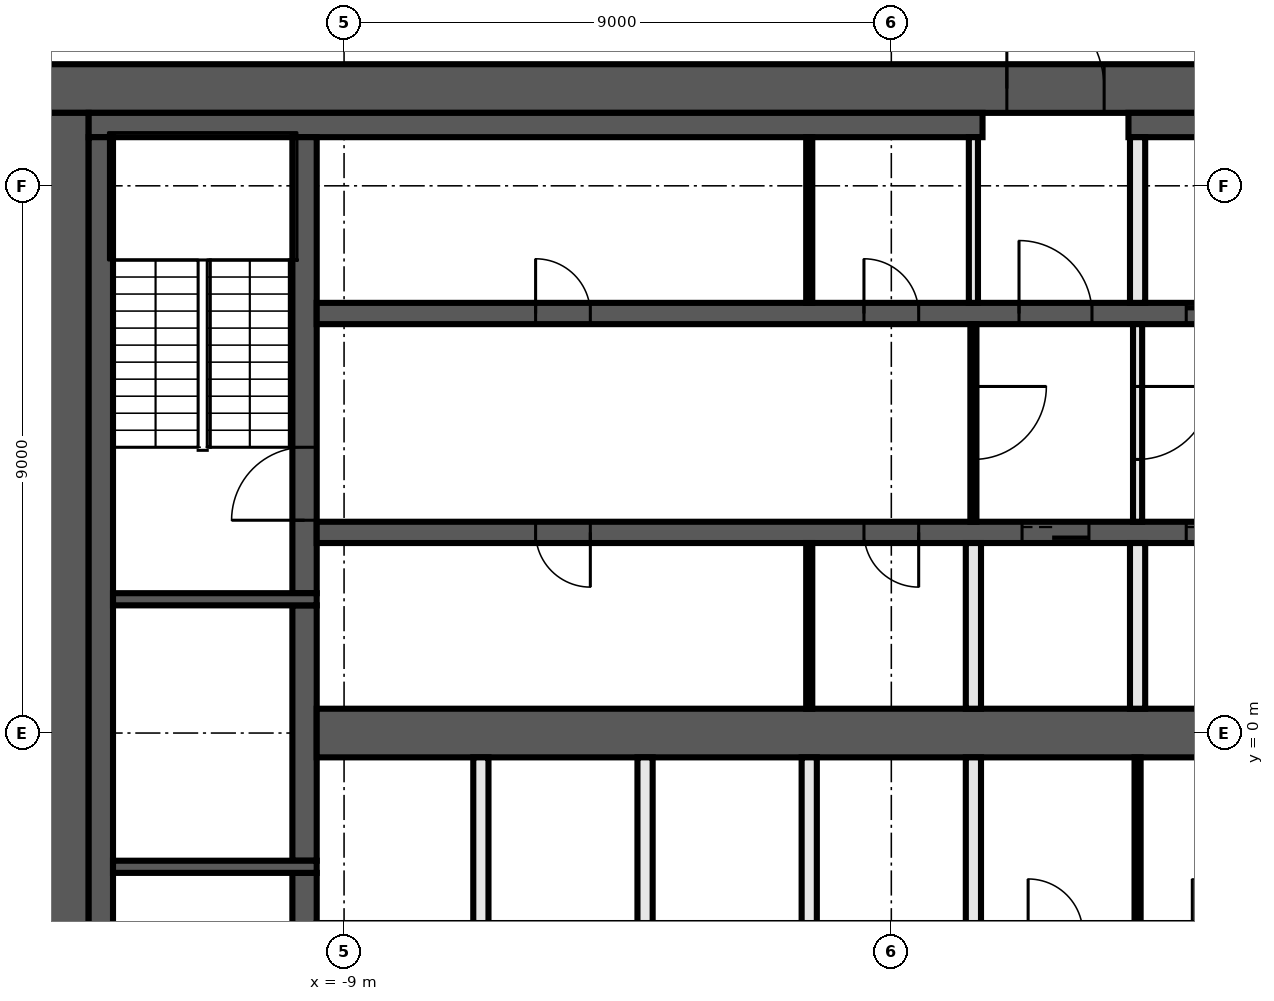
"""IFC4 building model, lengths in metres.
Left out: names, types, materials, properties, quantities, classifications, styles, units other than length and angle.
Written with IfcOpenShell. Run it as: python <this file> out.ifc"""

import sys

from ifc_helpers import new_model, si_unit, direction, frame, frame_2d, origin, place, context, subcontext, project, spatial, rectangle, extrude, element, fill, save


model = new_model("IFC4")
c1 = context("Model", 3, precision=1e-05, world=origin(), true_north=direction((0.0, 1.0)))
c2 = subcontext(c1, "Body", "Model", "MODEL_VIEW")
j1 = project(units=[si_unit("LENGTHUNIT", "METRE"), si_unit("PLANEANGLEUNIT", "RADIAN")], contexts=[c1])
p1 = place(None, origin())
s1 = spatial("IfcSite", under=j1, at=p1, CompositionType="ELEMENT")
p2 = place(p1, origin())
s2 = spatial("IfcBuilding", under=s1, at=p2, CompositionType="ELEMENT")
p3 = place(p2, frame((0.0, 0.0, 179.6)))
s3 = spatial("IfcBuildingStorey", under=s2, at=p3, CompositionType="ELEMENT", Elevation=179.6)
p4 = place(p3, frame((-14.0, 10.6, 0.0), z_axis=(0.0, 0.0, 1.0), x_axis=(1.0, 0.0, 0.0)))
e1 = element("IfcWall", 1, at=p4, inside=s3, PredefinedType="SHEAR", context=c2, shape_type="SweptSolid", body=[
    extrude(rectangle(XDim=28.0, YDim=0.8, at=frame_2d((14.0, 0.0))), origin(), (0.0, 0.0, 1.0), 3.7),
])
p5 = place(p4, frame((15.9, 0.0, 0.0)))
e2 = element("IfcOpeningElement", 2, at=p5, cuts=e1, PredefinedType="OPENING", context=c2, shape_type="SweptSolid", body=[
    extrude(rectangle(XDim=1.6, YDim=2.1, at=frame_2d((0.8, 1.05))), frame((0.0, 0.41, 0.0), z_axis=(0.0, -1.0, 0.0), x_axis=(1.0, 0.0, 0.0)), (0.0, 0.0, 1.0), 0.82),
])
p6 = place(p3, frame((-13.6, -10.2, 0.0), z_axis=(0.0, 0.0, 1.0), x_axis=(0.0, 1.0, 0.0)))
e3 = element("IfcWall", 3, at=p6, inside=s3, PredefinedType="SHEAR", context=c2, shape_type="SweptSolid", body=[
    extrude(rectangle(XDim=20.4, YDim=0.8, at=frame_2d((10.2, 0.0))), origin(), (0.0, 0.0, 1.0), 3.7),
])
p7 = place(p3, frame((-13.2, 10.0, 0.0), z_axis=(0.0, 0.0, 1.0), x_axis=(1.0, 0.0, 0.0)))
e4 = element("IfcWall", 4, at=p7, inside=s3, PredefinedType="SHEAR", context=c2, shape_type="SweptSolid", body=[
    extrude(rectangle(XDim=14.7, YDim=0.4, at=frame_2d((7.35, 0.0))), origin(), (0.0, 0.0, 1.0), 3.7),
])
p8 = place(p3, frame((3.9, 10.0, 0.0), z_axis=(0.0, 0.0, 1.0), x_axis=(1.0, 0.0, 0.0)))
e5 = element("IfcWall", 5, at=p8, inside=s3, PredefinedType="SHEAR", context=c2, shape_type="SweptSolid", body=[
    extrude(rectangle(XDim=9.3, YDim=0.4, at=frame_2d((4.65, 0.0))), origin(), (0.0, 0.0, 1.0), 3.7),
])
p9 = place(p3, frame((-13.0, -9.8, 0.0), z_axis=(0.0, 0.0, 1.0), x_axis=(0.0, 1.0, 0.0)))
e6 = element("IfcWall", 6, at=p9, inside=s3, PredefinedType="SHEAR", context=c2, shape_type="SweptSolid", body=[
    extrude(rectangle(XDim=19.6, YDim=0.4, at=frame_2d((9.8, 0.0))), origin(), (0.0, 0.0, 1.0), 3.7),
])
p10 = place(p3, frame((-9.65, -9.8, 0.0), z_axis=(0.0, 0.0, 1.0), x_axis=(0.0, 1.0, 0.0)))
e7 = element("IfcWall", 7, at=p10, inside=s3, PredefinedType="SHEAR", context=c2, shape_type="SweptSolid", body=[
    extrude(rectangle(XDim=7.5, YDim=0.4, at=frame_2d((3.75, 0.0))), origin(), (0.0, 0.0, 1.0), 3.7),
])
p11 = place(p10, frame((5.1, 0.0, 0.0)))
e8 = element("IfcOpeningElement", 8, at=p11, cuts=e7, PredefinedType="OPENING", context=c2, shape_type="SweptSolid", body=[
    extrude(rectangle(XDim=1.2, YDim=2.1, at=frame_2d((0.6, 1.05))), frame((0.0, 0.21, 0.0), z_axis=(0.0, -1.0, 0.0), x_axis=(1.0, 0.0, 0.0)), (0.0, 0.0, 1.0), 0.42),
])
p12 = place(p3, frame((-9.65, -2.1, 0.0), z_axis=(0.0, 0.0, 1.0), x_axis=(0.0, 1.0, 0.0)))
e9 = element("IfcWall", 9, at=p12, inside=s3, PredefinedType="SHEAR", context=c2, shape_type="SweptSolid", body=[
    extrude(rectangle(XDim=4.2, YDim=0.4, at=frame_2d((2.1, 0.0))), origin(), (0.0, 0.0, 1.0), 3.7),
])
p13 = place(p3, frame((-9.65, 2.3, 0.0), z_axis=(0.0, 0.0, 1.0), x_axis=(0.0, 1.0, 0.0)))
e10 = element("IfcWall", 10, at=p13, inside=s3, PredefinedType="SHEAR", context=c2, shape_type="SweptSolid", body=[
    extrude(rectangle(XDim=7.5, YDim=0.4, at=frame_2d((3.75, 0.0))), origin(), (0.0, 0.0, 1.0), 3.7),
])
p14 = place(p13, frame((1.2, 0.0, 0.0)))
e11 = element("IfcOpeningElement", 11, at=p14, cuts=e10, PredefinedType="OPENING", context=c2, shape_type="SweptSolid", body=[
    extrude(rectangle(XDim=1.2, YDim=2.1, at=frame_2d((0.6, 1.05))), frame((0.0, 0.21, 0.0), z_axis=(0.0, -1.0, 0.0), x_axis=(1.0, 0.0, 0.0)), (0.0, 0.0, 1.0), 0.42),
])
for number, where, z_axis, x_axis in (
    (12, (-9.45, 2.2, 0.0), (0.0, 0.0, 1.0), (-1.0, 0.0, 0.0)),
    (13, (-9.45, -2.2, 0.0), (0.0, 0.0, 1.0), (-1.0, 0.0, 0.0)),
):
    element("IfcWall", number, at=place(p3, frame(where, z_axis=z_axis, x_axis=x_axis)), inside=s3, PredefinedType="SHEAR", context=c2, shape_type="SweptSolid", body=[
        extrude(rectangle(XDim=3.35, YDim=0.2, at=frame_2d((1.675, 0.0))), origin(), (0.0, 0.0, 1.0), 3.7),
    ])
p15 = place(p3, frame((-9.45, 6.9, 0.0), z_axis=(0.0, 0.0, 1.0), x_axis=(1.0, 0.0, 0.0)))
e14 = element("IfcWall", 14, at=p15, inside=s3, PredefinedType="SHEAR", context=c2, shape_type="SweptSolid", body=[
    extrude(rectangle(XDim=18.9, YDim=0.35, at=frame_2d((9.45, 0.0))), origin(), (0.0, 0.0, 1.0), 3.7),
])
p16 = place(p15, frame((11.55, 0.0, 0.0)))
e15 = element("IfcOpeningElement", 15, at=p16, cuts=e14, PredefinedType="OPENING", context=c2, shape_type="SweptSolid", body=[
    extrude(rectangle(XDim=1.2, YDim=2.1, at=frame_2d((0.6, 1.05))), frame((0.0, 0.185, 0.0), z_axis=(0.0, -1.0, 0.0), x_axis=(1.0, 0.0, 0.0)), (0.0, 0.0, 1.0), 0.37),
])
p17 = place(p15, frame((14.3, 0.0, 0.0)))
e16 = element("IfcOpeningElement", 16, at=p17, cuts=e14, PredefinedType="OPENING", context=c2, shape_type="SweptSolid", body=[
    extrude(rectangle(XDim=1.1, YDim=2.1, at=frame_2d((0.55, 1.05))), frame((0.0, 0.185, 0.0), z_axis=(0.0, -1.0, 0.0), x_axis=(1.0, 0.0, 0.0)), (0.0, 0.0, 1.0), 0.37),
])
p18 = place(p15, frame((17.0, 0.0, 0.0)))
e17 = element("IfcOpeningElement", 17, at=p18, cuts=e14, PredefinedType="OPENING", context=c2, shape_type="SweptSolid", body=[
    extrude(rectangle(XDim=1.1, YDim=2.1, at=frame_2d((0.55, 1.05))), frame((0.0, 0.185, 0.0), z_axis=(0.0, -1.0, 0.0), x_axis=(1.0, 0.0, 0.0)), (0.0, 0.0, 1.0), 0.37),
])
p19 = place(p15, frame((3.6, 0.0, 0.0)))
e18 = element("IfcOpeningElement", 18, at=p19, cuts=e14, PredefinedType="OPENING", context=c2, shape_type="SweptSolid", body=[
    extrude(rectangle(XDim=0.9, YDim=2.1, at=frame_2d((0.45, 1.05))), frame((0.0, 0.185, 0.0), z_axis=(0.0, -1.0, 0.0), x_axis=(1.0, 0.0, 0.0)), (0.0, 0.0, 1.0), 0.37),
])
p20 = place(p15, frame((9.0, 0.0, 0.0)))
e19 = element("IfcOpeningElement", 19, at=p20, cuts=e14, PredefinedType="OPENING", context=c2, shape_type="SweptSolid", body=[
    extrude(rectangle(XDim=0.9, YDim=2.1, at=frame_2d((0.45, 1.05))), frame((0.0, 0.185, 0.0), z_axis=(0.0, -1.0, 0.0), x_axis=(1.0, 0.0, 0.0)), (0.0, 0.0, 1.0), 0.37),
])
p21 = place(p3, frame((9.45, 3.3, 0.0), z_axis=(0.0, 0.0, 1.0), x_axis=(-1.0, 0.0, 0.0)))
e20 = element("IfcWall", 20, at=p21, inside=s3, PredefinedType="SHEAR", context=c2, shape_type="SweptSolid", body=[
    extrude(rectangle(XDim=18.9, YDim=0.35, at=frame_2d((9.45, 0.0))), origin(), (0.0, 0.0, 1.0), 3.7),
])
p22 = place(p21, frame((6.2, 0.0, 0.0)))
e21 = element("IfcOpeningElement", 21, at=p22, cuts=e20, PredefinedType="OPENING", context=c2, shape_type="SweptSolid", body=[
    extrude(rectangle(XDim=1.1, YDim=2.1, at=frame_2d((0.55, 1.05))), frame((0.0, 0.185, 0.0), z_axis=(0.0, -1.0, 0.0), x_axis=(1.0, 0.0, 0.0)), (0.0, 0.0, 1.0), 0.37),
])
p23 = place(p21, frame((3.5, 0.0, 0.0)))
e22 = element("IfcOpeningElement", 22, at=p23, cuts=e20, PredefinedType="OPENING", context=c2, shape_type="SweptSolid", body=[
    extrude(rectangle(XDim=1.1, YDim=2.1, at=frame_2d((0.55, 1.05))), frame((0.0, 0.185, 0.0), z_axis=(0.0, -1.0, 0.0), x_axis=(1.0, 0.0, 0.0)), (0.0, 0.0, 1.0), 0.37),
])
p24 = place(p21, frame((0.9, 0.0, 0.0)))
e23 = element("IfcOpeningElement", 23, at=p24, cuts=e20, PredefinedType="OPENING", context=c2, shape_type="SweptSolid", body=[
    extrude(rectangle(XDim=0.9, YDim=2.1, at=frame_2d((0.45, 1.05))), frame((0.0, 0.185, 0.0), z_axis=(0.0, -1.0, 0.0), x_axis=(1.0, 0.0, 0.0)), (0.0, 0.0, 1.0), 0.37),
])
p25 = place(p21, frame((14.4, 0.0, 0.0)))
e24 = element("IfcOpeningElement", 24, at=p25, cuts=e20, PredefinedType="OPENING", context=c2, shape_type="SweptSolid", body=[
    extrude(rectangle(XDim=0.9, YDim=2.1, at=frame_2d((0.45, 1.05))), frame((0.0, 0.185, 0.0), z_axis=(0.0, -1.0, 0.0), x_axis=(1.0, 0.0, 0.0)), (0.0, 0.0, 1.0), 0.37),
])
p26 = place(p21, frame((9.0, 0.0, 0.0)))
e25 = element("IfcOpeningElement", 25, at=p26, cuts=e20, PredefinedType="OPENING", context=c2, shape_type="SweptSolid", body=[
    extrude(rectangle(XDim=0.9, YDim=2.1, at=frame_2d((0.45, 1.05))), frame((0.0, 0.185, 0.0), z_axis=(0.0, -1.0, 0.0), x_axis=(1.0, 0.0, 0.0)), (0.0, 0.0, 1.0), 0.37),
])
p27 = place(p3, frame((-9.45, 0.0, 0.0), z_axis=(0.0, 0.0, 1.0), x_axis=(1.0, 0.0, 0.0)))
e26 = element("IfcWall", 26, at=p27, inside=s3, PredefinedType="SHEAR", context=c2, shape_type="SweptSolid", body=[
    extrude(rectangle(XDim=18.9, YDim=0.8, at=frame_2d((9.45, 0.0))), origin(), (0.0, 0.0, 1.0), 3.7),
])
p28 = place(p3, frame((4.05, 6.725, 0.0), z_axis=(0.0, 0.0, 1.0), x_axis=(0.0, -1.0, 0.0)))
e27 = element("IfcWall", 27, at=p28, inside=s3, PredefinedType="PARTITIONING", context=c2, shape_type="SweptSolid", body=[
    extrude(rectangle(XDim=3.25, YDim=0.15, at=frame_2d((1.625, 0.0))), origin(), (0.0, 0.0, 1.0), 3.7),
])
p29 = place(p28, frame((1.025, 0.0, 0.0)))
e28 = element("IfcOpeningElement", 28, at=p29, cuts=e27, PredefinedType="OPENING", context=c2, shape_type="SweptSolid", body=[
    extrude(rectangle(XDim=1.2, YDim=2.1, at=frame_2d((0.6, 1.05))), frame((0.0, 0.085, 0.0), z_axis=(0.0, -1.0, 0.0), x_axis=(1.0, 0.0, 0.0)), (0.0, 0.0, 1.0), 0.17),
])
p30 = place(p3, frame((4.05, -3.125, 0.0), z_axis=(0.0, 0.0, 1.0), x_axis=(0.0, 1.0, 0.0)))
e29 = element("IfcWall", 29, at=p30, inside=s3, PredefinedType="PARTITIONING", context=c2, shape_type="SweptSolid", body=[
    extrude(rectangle(XDim=2.725, YDim=0.1, at=frame_2d((1.363, 0.0))), origin(), (0.0, 0.0, 1.0), 3.7),
])
for number, where, z_axis, x_axis in (
    (30, (4.05, 0.4, 0.0), (0.0, 0.0, 1.0), (0.0, 1.0, 0.0)),
    (31, (4.05, 7.075, 0.0), (0.0, 0.0, 1.0), (0.0, 1.0, 0.0)),
):
    element("IfcWall", number, at=place(p3, frame(where, z_axis=z_axis, x_axis=x_axis)), inside=s3, PredefinedType="SOLIDWALL", context=c2, shape_type="SweptSolid", body=[
        extrude(rectangle(XDim=2.725, YDim=0.25, at=frame_2d((1.363, 0.0))), origin(), (0.0, 0.0, 1.0), 3.7),
    ])
p31 = place(p3, frame((1.35, 7.075, 0.0), z_axis=(0.0, 0.0, 1.0), x_axis=(0.0, 1.0, 0.0)))
e32 = element("IfcWall", 32, at=p31, inside=s3, PredefinedType="PARTITIONING", context=c2, shape_type="SweptSolid", body=[
    extrude(rectangle(XDim=2.725, YDim=0.15, at=frame_2d((1.363, 0.0))), origin(), (0.0, 0.0, 1.0), 3.7),
])
p32 = place(p3, frame((1.35, 6.725, 0.0), z_axis=(0.0, 0.0, 1.0), x_axis=(0.0, -1.0, 0.0)))
e33 = element("IfcWall", 33, at=p32, inside=s3, PredefinedType="PARTITIONING", context=c2, shape_type="SweptSolid", body=[
    extrude(rectangle(XDim=3.25, YDim=0.1, at=frame_2d((1.625, 0.0))), origin(), (0.0, 0.0, 1.0), 3.7),
])
p33 = place(p32, frame((1.025, 0.0, 0.0)))
e34 = element("IfcOpeningElement", 34, at=p33, cuts=e33, PredefinedType="OPENING", context=c2, shape_type="SweptSolid", body=[
    extrude(rectangle(XDim=1.2, YDim=2.1, at=frame_2d((0.6, 1.05))), frame((0.0, 0.06, 0.0), z_axis=(0.0, -1.0, 0.0), x_axis=(1.0, 0.0, 0.0)), (0.0, 0.0, 1.0), 0.12),
])
for number, where, z_axis, x_axis in (
    (35, (1.35, -3.125, 0.0), (0.0, 0.0, 1.0), (0.0, 1.0, 0.0)),
    (36, (1.35, 0.4, 0.0), (0.0, 0.0, 1.0), (0.0, 1.0, 0.0)),
):
    element("IfcWall", number, at=place(p3, frame(where, z_axis=z_axis, x_axis=x_axis)), inside=s3, PredefinedType="SOLIDWALL", context=c2, shape_type="SweptSolid", body=[
        extrude(rectangle(XDim=2.725, YDim=0.25, at=frame_2d((1.363, 0.0))), origin(), (0.0, 0.0, 1.0), 3.7),
    ])
for number, where, z_axis, x_axis in (
    (37, (-1.35, 0.4, 0.0), (0.0, 0.0, 1.0), (0.0, 1.0, 0.0)),
    (38, (-1.35, 7.075, 0.0), (0.0, 0.0, 1.0), (0.0, 1.0, 0.0)),
):
    element("IfcWall", number, at=place(p3, frame(where, z_axis=z_axis, x_axis=x_axis)), inside=s3, PredefinedType="PARTITIONING", context=c2, shape_type="SweptSolid", body=[
        extrude(rectangle(XDim=2.725, YDim=0.1, at=frame_2d((1.363, 0.0))), origin(), (0.0, 0.0, 1.0), 3.7),
    ])
for number, where, z_axis, x_axis in (
    (39, (-1.35, -3.125, 0.0), (0.0, 0.0, 1.0), (0.0, 1.0, 0.0)),
    (40, (-4.05, -3.125, 0.0), (0.0, 0.0, 1.0), (0.0, 1.0, 0.0)),
    (41, (-6.75, -3.125, 0.0), (0.0, 0.0, 1.0), (0.0, 1.0, 0.0)),
):
    element("IfcWall", number, at=place(p3, frame(where, z_axis=z_axis, x_axis=x_axis)), inside=s3, PredefinedType="SOLIDWALL", context=c2, shape_type="SweptSolid", body=[
        extrude(rectangle(XDim=2.725, YDim=0.25, at=frame_2d((1.363, 0.0))), origin(), (0.0, 0.0, 1.0), 3.7),
    ])
p34 = place(p5, origin())
e42 = element("IfcDoor", 42, at=p34, inside=s3, OperationType="DOUBLE_DOOR_SINGLE_SWING", PredefinedType="DOOR", context=c2, shape_type="SweptSolid", body=[
    extrude(rectangle(XDim=1.6, YDim=2.1, at=frame_2d((0.8, 1.05))), frame((0.0, 0.025, 0.0), z_axis=(0.0, -1.0, 0.0), x_axis=(1.0, 0.0, 0.0)), (0.0, 0.0, 1.0), 0.05),
])
fill(e2, e42)
p35 = place(p16, origin())
e43 = element("IfcDoor", 43, at=p35, inside=s3, OperationType="SINGLE_SWING_LEFT", PredefinedType="DOOR", context=c2, shape_type="SweptSolid", body=[
    extrude(rectangle(XDim=1.2, YDim=2.1, at=frame_2d((0.6, 1.05))), frame((0.0, 0.025, 0.0), z_axis=(0.0, -1.0, 0.0), x_axis=(1.0, 0.0, 0.0)), (0.0, 0.0, 1.0), 0.05),
])
fill(e15, e43)
p36 = place(p17, origin())
e44 = element("IfcDoor", 44, at=p36, inside=s3, OperationType="DOUBLE_DOOR_SLIDING", PredefinedType="DOOR", context=c2, shape_type="SweptSolid", body=[
    extrude(rectangle(XDim=1.1, YDim=2.1, at=frame_2d((0.55, 1.05))), frame((0.0, 0.025, 0.0), z_axis=(0.0, -1.0, 0.0), x_axis=(1.0, 0.0, 0.0)), (0.0, 0.0, 1.0), 0.05),
])
fill(e16, e44)
p37 = place(p22, origin())
e45 = element("IfcDoor", 45, at=p37, inside=s3, OperationType="DOUBLE_DOOR_SLIDING", PredefinedType="DOOR", context=c2, shape_type="SweptSolid", body=[
    extrude(rectangle(XDim=1.1, YDim=2.1, at=frame_2d((0.55, 1.05))), frame((0.0, 0.025, 0.0), z_axis=(0.0, -1.0, 0.0), x_axis=(1.0, 0.0, 0.0)), (0.0, 0.0, 1.0), 0.05),
])
fill(e21, e45)
p38 = place(p23, origin())
e46 = element("IfcDoor", 46, at=p38, inside=s3, OperationType="DOUBLE_DOOR_SLIDING", PredefinedType="DOOR", context=c2, shape_type="SweptSolid", body=[
    extrude(rectangle(XDim=1.1, YDim=2.1, at=frame_2d((0.55, 1.05))), frame((0.0, 0.025, 0.0), z_axis=(0.0, -1.0, 0.0), x_axis=(1.0, 0.0, 0.0)), (0.0, 0.0, 1.0), 0.05),
])
fill(e22, e46)
p39 = place(p19, origin())
e47 = element("IfcDoor", 47, at=p39, inside=s3, OperationType="SINGLE_SWING_RIGHT", PredefinedType="DOOR", context=c2, shape_type="SweptSolid", body=[
    extrude(rectangle(XDim=0.9, YDim=2.1, at=frame_2d((0.45, 1.05))), frame((0.0, 0.025, 0.0), z_axis=(0.0, -1.0, 0.0), x_axis=(1.0, 0.0, 0.0)), (0.0, 0.0, 1.0), 0.05),
])
fill(e18, e47)
p40 = place(p20, origin())
e48 = element("IfcDoor", 48, at=p40, inside=s3, OperationType="SINGLE_SWING_LEFT", PredefinedType="DOOR", context=c2, shape_type="SweptSolid", body=[
    extrude(rectangle(XDim=0.9, YDim=2.1, at=frame_2d((0.45, 1.05))), frame((0.0, 0.025, 0.0), z_axis=(0.0, -1.0, 0.0), x_axis=(1.0, 0.0, 0.0)), (0.0, 0.0, 1.0), 0.05),
])
fill(e19, e48)
p41 = place(p25, origin())
e49 = element("IfcDoor", 49, at=p41, inside=s3, OperationType="SINGLE_SWING_RIGHT", PredefinedType="DOOR", context=c2, shape_type="SweptSolid", body=[
    extrude(rectangle(XDim=0.9, YDim=2.1, at=frame_2d((0.45, 1.05))), frame((0.0, 0.025, 0.0), z_axis=(0.0, -1.0, 0.0), x_axis=(1.0, 0.0, 0.0)), (0.0, 0.0, 1.0), 0.05),
])
fill(e24, e49)
p42 = place(p26, origin())
e50 = element("IfcDoor", 50, at=p42, inside=s3, OperationType="SINGLE_SWING_LEFT", PredefinedType="DOOR", context=c2, shape_type="SweptSolid", body=[
    extrude(rectangle(XDim=0.9, YDim=2.1, at=frame_2d((0.45, 1.05))), frame((0.0, 0.025, 0.0), z_axis=(0.0, -1.0, 0.0), x_axis=(1.0, 0.0, 0.0)), (0.0, 0.0, 1.0), 0.05),
])
fill(e25, e50)
p43 = place(p14, origin())
e51 = element("IfcDoor", 51, at=p43, inside=s3, OperationType="SINGLE_SWING_RIGHT", PredefinedType="DOOR", context=c2, shape_type="SweptSolid", body=[
    extrude(rectangle(XDim=1.2, YDim=2.1, at=frame_2d((0.6, 1.05))), frame((0.0, 0.025, 0.0), z_axis=(0.0, -1.0, 0.0), x_axis=(1.0, 0.0, 0.0)), (0.0, 0.0, 1.0), 0.05),
])
fill(e11, e51)
p44 = place(p33, origin())
e52 = element("IfcDoor", 52, at=p44, inside=s3, OperationType="SINGLE_SWING_LEFT", PredefinedType="DOOR", context=c2, shape_type="SweptSolid", body=[
    extrude(rectangle(XDim=1.2, YDim=2.1, at=frame_2d((0.6, 1.05))), frame((0.0, 0.025, 0.0), z_axis=(0.0, -1.0, 0.0), x_axis=(1.0, 0.0, 0.0)), (0.0, 0.0, 1.0), 0.05),
])
fill(e34, e52)
p45 = place(p29, origin())
e53 = element("IfcDoor", 53, at=p45, inside=s3, OperationType="SINGLE_SWING_RIGHT", PredefinedType="DOOR", context=c2, shape_type="SweptSolid", body=[
    extrude(rectangle(XDim=1.2, YDim=2.1, at=frame_2d((0.6, 1.05))), frame((0.0, 0.025, 0.0), z_axis=(0.0, -1.0, 0.0), x_axis=(1.0, 0.0, 0.0)), (0.0, 0.0, 1.0), 0.05),
])
fill(e28, e53)
save(model, sys.argv[1])
